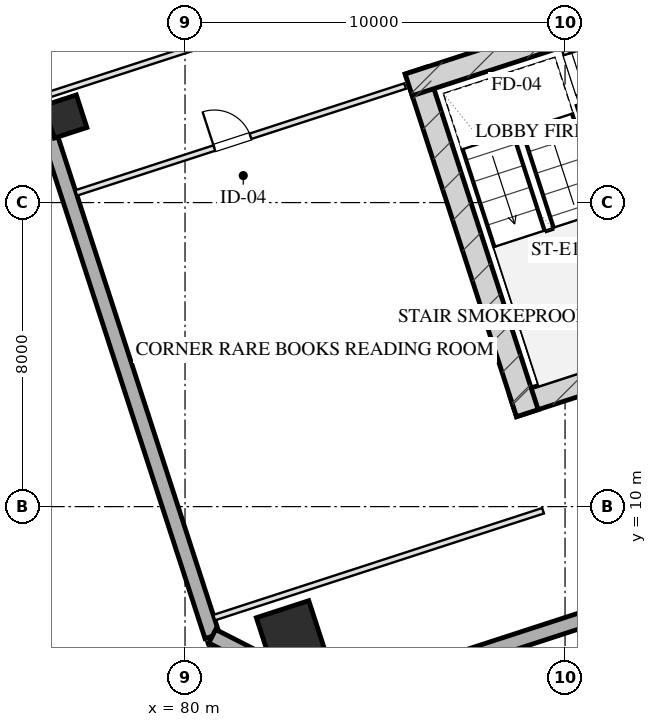
"""IFC4 building model, lengths in metres.
Left out: names, types, materials, properties, quantities, classifications, styles, units other than length and angle.
Written with IfcOpenShell. Run it as: python <this file> out.ifc"""

import sys

from ifc_helpers import new_model, si_unit, direction, frame, frame_2d, origin, origin_2d, place, context, subcontext, project, spatial, rectangle, hollow_rectangle, extrude, element, fill, save


model = new_model("IFC4")
c1 = context("Model", 3, precision=1e-05, world=origin(), true_north=direction((0.0, 1.0)))
c2 = subcontext(c1, "Body", "Model", "MODEL_VIEW")
j1 = project(units=[si_unit("LENGTHUNIT", "METRE"), si_unit("PLANEANGLEUNIT", "RADIAN")], contexts=[c1])
p1 = place(None, origin())
s1 = spatial("IfcSite", under=j1, at=p1, CompositionType="ELEMENT")
p2 = place(p1, origin())
s2 = spatial("IfcBuilding", under=s1, at=p2, CompositionType="ELEMENT")
p3 = place(p2, frame((0.0, 0.0, 103.5)))
s3 = spatial("IfcBuildingStorey", under=s2, at=p3, CompositionType="ELEMENT", Elevation=103.5)
p4 = place(p3, frame((88.63, 12.652, 0.0), z_axis=(0.0, 0.0, 1.0), x_axis=(0.95105714907, 0.309015046886, 0.0)))
e1 = element("IfcWall", 1, at=p4, inside=s3, PredefinedType="SHEAR", context=c2, shape_type="SweptSolid", body=[
    extrude(rectangle(XDim=16.4, YDim=0.6, at=frame_2d((8.2, 0.0))), origin(), (0.0, 0.0, 1.0), 3.45),
])
p5 = place(p3, frame((86.078, 21.475, 0.0), z_axis=(0.0, 0.0, 1.0), x_axis=(0.309017938678, -0.951056209472, 0.0)))
e2 = element("IfcWall", 2, at=p5, inside=s3, PredefinedType="SHEAR", context=c2, shape_type="SweptSolid", body=[
    extrude(rectangle(XDim=9.48, YDim=0.6, at=frame_2d((4.74, 0.0))), origin(), (0.0, 0.0, 1.0), 3.45),
])
p6 = place(p3, frame((85.886, 21.097, 0.0), z_axis=(0.0, 0.0, 1.0), x_axis=(0.951068073652, 0.308981422225, 0.0)))
e3 = element("IfcWall", 3, at=p6, inside=s3, PredefinedType="SHEAR", context=c2, shape_type="SweptSolid", body=[
    extrude(rectangle(XDim=4.22, YDim=0.6, at=frame_2d((2.11, 0.0))), origin(), (0.0, 0.0, 1.0), 3.45),
])
p7 = place(p3, frame((82.791, 6.612, 0.0), z_axis=(0.0, 0.0, 1.0), x_axis=(0.951056516295, 0.309016994375, 0.0)))
e4 = element("IfcColumn", 4, at=p7, inside=s3, PredefinedType="COLUMN", context=c2, shape_type="SweptSolid", body=[
    extrude(hollow_rectangle(XDim=1.45, YDim=1.45, WallThickness=0.05, at=origin_2d()), origin(), (0.0, 0.0, 1.0), 3.451),
])
p8 = place(p3, frame((76.851, 20.264, 0.0), z_axis=(0.0, 0.0, 1.0), x_axis=(0.951056516295, 0.309016994375, 0.0)))
e5 = element("IfcColumn", 5, at=p8, inside=s3, PredefinedType="COLUMN", context=c2, shape_type="SweptSolid", body=[
    extrude(hollow_rectangle(XDim=0.9, YDim=0.9, WallThickness=0.032, at=origin_2d()), origin(), (0.0, 0.0, 1.0), 3.451),
])
p9 = place(p3, frame((80.716, 6.59, 0.0), z_axis=(0.0, 0.0, 1.0), x_axis=(-0.309017542002, 0.95105633836, 0.0)))
e6 = element("IfcWall", 6, at=p9, inside=s3, PredefinedType="SOLIDWALL", context=c2, shape_type="SweptSolid", body=[
    extrude(rectangle(XDim=46.4, YDim=0.4, at=frame_2d((23.2, 0.0))), origin(), (0.0, 0.0, 1.0), 2.61),
])
p10 = place(p9, frame((24.6, 0.0, 0.75)))
e7 = element("IfcOpeningElement", 7, at=p10, cuts=e6, PredefinedType="OPENING", context=c2, shape_type="SweptSolid", body=[
    extrude(rectangle(XDim=2.4, YDim=1.46, at=frame_2d((1.2, 0.73))), frame((0.0, 0.21, 0.0), z_axis=(0.0, -1.0, 0.0), x_axis=(1.0, 0.0, 0.0)), (0.0, 0.0, 1.0), 0.42),
])
p11 = place(p9, frame((28.4, 0.0, 0.75)))
e8 = element("IfcOpeningElement", 8, at=p11, cuts=e6, PredefinedType="OPENING", context=c2, shape_type="SweptSolid", body=[
    extrude(rectangle(XDim=2.4, YDim=1.46, at=frame_2d((1.2, 0.73))), frame((0.0, 0.21, 0.0), z_axis=(0.0, -1.0, 0.0), x_axis=(1.0, 0.0, 0.0)), (0.0, 0.0, 1.0), 0.42),
])
p12 = place(p9, frame((16.77, 0.0, 0.0)))
e9 = element("IfcOpeningElement", 9, at=p12, cuts=e6, PredefinedType="OPENING", context=c2, shape_type="SweptSolid", body=[
    extrude(rectangle(XDim=1.1, YDim=2.15, at=frame_2d((0.55, 1.075))), frame((0.0, 0.21, 0.0), z_axis=(0.0, -1.0, 0.0), x_axis=(1.0, 0.0, 0.0)), (0.0, 0.0, 1.0), 0.42),
])
p13 = place(p3, frame((111.953, 14.005, 0.0), z_axis=(0.0, 0.0, 1.0), x_axis=(-0.95105505922, -0.309021478754, 0.0)))
e10 = element("IfcWall", 10, at=p13, inside=s3, PredefinedType="SOLIDWALL", context=c2, shape_type="SweptSolid", body=[
    extrude(rectangle(XDim=29.4, YDim=0.4, at=frame_2d((14.7, 0.0))), origin(), (0.0, 0.0, 1.0), 2.61),
])
p14 = place(p3, frame((83.992, 4.92, 0.0), z_axis=(0.0, 0.0, 1.0), x_axis=(-0.891001999643, 0.45399937955, 0.0)))
e11 = element("IfcWall", 11, at=p14, inside=s3, PredefinedType="SOLIDWALL", context=c2, shape_type="SweptSolid", body=[
    extrude(rectangle(XDim=3.677, YDim=0.4, at=frame_2d((1.839, 0.0))), origin(), (0.0, 0.0, 1.0), 2.61),
])
p15 = place(p3, frame((89.899, 22.401, 0.0), z_axis=(0.0, 0.0, 1.0), x_axis=(0.308932062672, -0.951084108086, 0.0)))
e12 = element("IfcWall", 12, at=p15, inside=s3, PredefinedType="PARTITIONING", context=c2, shape_type="SweptSolid", body=[
    extrude(rectangle(XDim=1.9, YDim=0.2, at=frame_2d((0.95, 0.0))), origin(), (0.0, 0.0, 1.0), 3.175),
])
p16 = place(p15, frame((0.52, 0.0, 0.0)))
e13 = element("IfcOpeningElement", 13, at=p16, cuts=e12, PredefinedType="OPENING", context=c2, shape_type="SweptSolid", body=[
    extrude(rectangle(XDim=1.1, YDim=2.05, at=frame_2d((0.55, 1.025))), frame((0.0, 0.11, 0.0), z_axis=(0.0, -1.0, 0.0), x_axis=(1.0, 0.0, 0.0)), (0.0, 0.0, 1.0), 0.22),
])
p17 = place(p3, frame((80.767, 7.079, 0.0), z_axis=(0.0, 0.0, 1.0), x_axis=(0.951057133767, 0.309015093986, 0.0)))
e14 = element("IfcWall", 14, at=p17, inside=s3, PredefinedType="PARTITIONING", context=c2, shape_type="SweptSolid", body=[
    extrude(rectangle(XDim=9.1, YDim=0.15, at=frame_2d((4.55, 0.0))), origin(), (0.0, 0.0, 1.0), 3.175),
])
p18 = place(p3, frame((77.136, 18.254, 0.0), z_axis=(0.0, 0.0, 1.0), x_axis=(0.951057133767, 0.309015093986, 0.0)))
e15 = element("IfcWall", 15, at=p18, inside=s3, PredefinedType="PARTITIONING", context=c2, shape_type="SweptSolid", body=[
    extrude(rectangle(XDim=9.1, YDim=0.15, at=frame_2d((4.55, 0.0))), origin(), (0.0, 0.0, 1.0), 3.175),
])
p19 = place(p18, frame((3.822, 0.0, 0.0)))
e16 = element("IfcOpeningElement", 16, at=p19, cuts=e15, PredefinedType="OPENING", context=c2, shape_type="SweptSolid", body=[
    extrude(rectangle(XDim=1.0, YDim=2.05, at=frame_2d((0.5, 1.025))), frame((0.0, 0.085, 0.0), z_axis=(0.0, -1.0, 0.0), x_axis=(1.0, 0.0, 0.0)), (0.0, 0.0, 1.0), 0.17),
])
p20 = place(p3, frame((76.308, 20.803, 0.0), z_axis=(0.0, 0.0, 1.0), x_axis=(0.95105437725, 0.3090235776, 0.0)))
e17 = element("IfcWall", 17, at=p20, inside=s3, PredefinedType="PARTITIONING", context=c2, shape_type="SweptSolid", body=[
    extrude(rectangle(XDim=7.95, YDim=0.15, at=frame_2d((3.975, 0.0))), origin(), (0.0, 0.0, 1.0), 3.175),
])
p21 = place(p16, origin())
e18 = element("IfcDoor", 18, at=p21, inside=s3, OperationType="SINGLE_SWING_LEFT", PredefinedType="DOOR", context=c2, shape_type="SweptSolid", body=[
    extrude(rectangle(XDim=1.1, YDim=2.05, at=frame_2d((0.55, 1.025))), frame((0.0, 0.025, 0.0), z_axis=(0.0, -1.0, 0.0), x_axis=(1.0, 0.0, 0.0)), (0.0, 0.0, 1.0), 0.05),
])
fill(e13, e18)
p22 = place(p19, origin())
e19 = element("IfcDoor", 19, at=p22, inside=s3, OperationType="SINGLE_SWING_LEFT", PredefinedType="DOOR", context=c2, shape_type="SweptSolid", body=[
    extrude(rectangle(XDim=1.0, YDim=2.05, at=frame_2d((0.5, 1.025))), frame((0.0, 0.025, 0.0), z_axis=(0.0, -1.0, 0.0), x_axis=(1.0, 0.0, 0.0)), (0.0, 0.0, 1.0), 0.05),
])
fill(e16, e19)
save(model, sys.argv[1])
